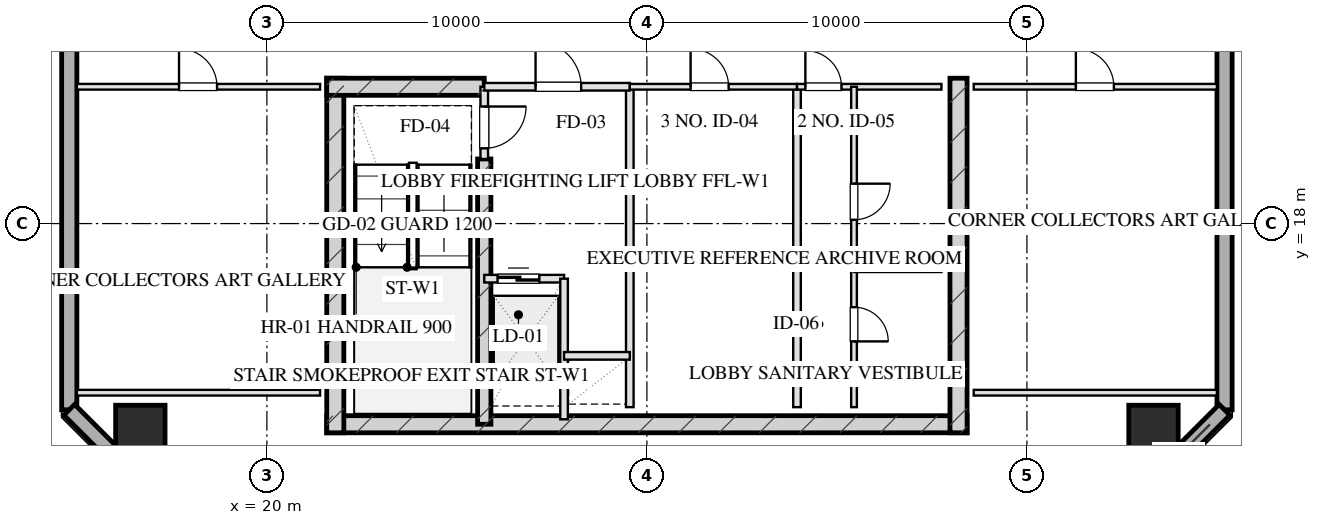
"""IFC4 building model, lengths in metres.
Left out: names, types, materials, properties, quantities, classifications, styles, units other than length and angle.
Written with IfcOpenShell. Run it as: python <this file> out.ifc"""

import sys

from ifc_helpers import new_model, si_unit, direction, frame, frame_2d, origin, origin_2d, place, context, subcontext, project, spatial, rectangle, hollow_rectangle, extrude, element, fill, save


model = new_model("IFC4")
c1 = context("Model", 3, precision=1e-05, world=origin(), true_north=direction((0.0, 1.0)))
c2 = subcontext(c1, "Body", "Model", "MODEL_VIEW")
j1 = project(units=[si_unit("LENGTHUNIT", "METRE"), si_unit("PLANEANGLEUNIT", "RADIAN")], contexts=[c1])
p1 = place(None, origin())
s1 = spatial("IfcSite", under=j1, at=p1, CompositionType="ELEMENT")
p2 = place(p1, origin())
s2 = spatial("IfcBuilding", under=s1, at=p2, CompositionType="ELEMENT")
p3 = place(p2, frame((0.0, 0.0, 244.0)))
s3 = spatial("IfcBuildingStorey", under=s2, at=p3, CompositionType="ELEMENT", Elevation=244.0)
p4 = place(p3, frame((21.575, 12.72, 0.0), z_axis=(0.0, 0.0, 1.0), x_axis=(1.0, 0.0, 0.0)))
e1 = element("IfcWall", 1, at=p4, inside=s3, PredefinedType="SHEAR", context=c2, shape_type="SweptSolid", body=[
    extrude(rectangle(XDim=16.85, YDim=0.45, at=frame_2d((8.425, 0.0))), origin(), (0.0, 0.0, 1.0), 3.2),
])
for number, where, z_axis, x_axis in (
    (2, (21.8, 21.825, 0.0), (0.0, 0.0, 1.0), (0.0, -1.0, 0.0)),
    (3, (38.2, 21.825, 0.0), (0.0, 0.0, 1.0), (0.0, -1.0, 0.0)),
):
    element("IfcWall", number, at=place(p3, frame(where, z_axis=z_axis, x_axis=x_axis)), inside=s3, PredefinedType="SHEAR", context=c2, shape_type="SweptSolid", body=[
        extrude(rectangle(XDim=9.33, YDim=0.45, at=frame_2d((4.665, 0.0))), origin(), (0.0, 0.0, 1.0), 3.2),
    ])
p5 = place(p3, frame((25.72, 19.7, 0.0), z_axis=(0.0, 0.0, 1.0), x_axis=(0.0, -1.0, 0.0)))
e4 = element("IfcWall", 4, at=p5, inside=s3, PredefinedType="SHEAR", context=c2, shape_type="SweptSolid", body=[
    extrude(rectangle(XDim=6.98, YDim=0.35, at=frame_2d((3.49, 0.0))), origin(), (0.0, 0.0, 1.0), 3.2),
])
p6 = place(p3, frame((21.575, 21.6, 0.0), z_axis=(0.0, 0.0, 1.0), x_axis=(1.0, 0.0, 0.0)))
e5 = element("IfcWall", 5, at=p6, inside=s3, PredefinedType="SHEAR", context=c2, shape_type="SweptSolid", body=[
    extrude(rectangle(XDim=4.145, YDim=0.45, at=frame_2d((2.073, 0.0))), origin(), (0.0, 0.0, 1.0), 3.2),
])
for number, where, z_axis, x_axis in (
    (6, (16.67, 12.57, 0.0), (0.0, 0.0, 1.0), (1.0, 0.0, 0.0)),
    (7, (43.33, 12.57, 0.0), (0.0, 0.0, 1.0), (1.0, 0.0, 0.0)),
):
    element("IfcColumn", number, at=place(p3, frame(where, z_axis=z_axis, x_axis=x_axis)), inside=s3, PredefinedType="COLUMN", context=c2, shape_type="SweptSolid", body=[
        extrude(hollow_rectangle(XDim=1.3, YDim=1.3, WallThickness=0.045, at=origin_2d()), origin(), (0.0, 0.0, 1.0), 3.201),
    ])
p7 = place(p3, frame((14.8, 13.1, 0.0), z_axis=(0.0, 0.0, 1.0), x_axis=(0.0, 1.0, 0.0)))
e8 = element("IfcWall", 8, at=p7, inside=s3, PredefinedType="SOLIDWALL", context=c2, shape_type="SweptSolid", body=[
    extrude(rectangle(XDim=41.8, YDim=0.4, at=frame_2d((20.9, 0.0))), origin(), (0.0, 0.0, 1.0), 2.36),
])
p8 = place(p7, frame((13.525, 0.0, 0.75)))
e9 = element("IfcOpeningElement", 9, at=p8, cuts=e8, PredefinedType="OPENING", context=c2, shape_type="SweptSolid", body=[
    extrude(rectangle(XDim=1.95, YDim=1.21, at=frame_2d((0.975, 0.605))), frame((0.0, 0.21, 0.0), z_axis=(0.0, -1.0, 0.0), x_axis=(1.0, 0.0, 0.0)), (0.0, 0.0, 1.0), 0.42),
])
p9 = place(p7, frame((17.325, 0.0, 0.75)))
e10 = element("IfcOpeningElement", 10, at=p9, cuts=e8, PredefinedType="OPENING", context=c2, shape_type="SweptSolid", body=[
    extrude(rectangle(XDim=1.95, YDim=1.21, at=frame_2d((0.975, 0.605))), frame((0.0, 0.21, 0.0), z_axis=(0.0, -1.0, 0.0), x_axis=(1.0, 0.0, 0.0)), (0.0, 0.0, 1.0), 0.42),
])
p10 = place(p7, frame((22.525, 0.0, 0.75)))
e11 = element("IfcOpeningElement", 11, at=p10, cuts=e8, PredefinedType="OPENING", context=c2, shape_type="SweptSolid", body=[
    extrude(rectangle(XDim=1.95, YDim=1.21, at=frame_2d((0.975, 0.605))), frame((0.0, 0.21, 0.0), z_axis=(0.0, -1.0, 0.0), x_axis=(1.0, 0.0, 0.0)), (0.0, 0.0, 1.0), 0.42),
])
p11 = place(p7, frame((26.325, 0.0, 0.75)))
e12 = element("IfcOpeningElement", 12, at=p11, cuts=e8, PredefinedType="OPENING", context=c2, shape_type="SweptSolid", body=[
    extrude(rectangle(XDim=1.95, YDim=1.21, at=frame_2d((0.975, 0.605))), frame((0.0, 0.21, 0.0), z_axis=(0.0, -1.0, 0.0), x_axis=(1.0, 0.0, 0.0)), (0.0, 0.0, 1.0), 0.42),
])
p12 = place(p3, frame((45.2, 54.9, 0.0), z_axis=(0.0, 0.0, 1.0), x_axis=(0.0, -1.0, 0.0)))
e13 = element("IfcWall", 13, at=p12, inside=s3, PredefinedType="SOLIDWALL", context=c2, shape_type="SweptSolid", body=[
    extrude(rectangle(XDim=41.8, YDim=0.4, at=frame_2d((20.9, 0.0))), origin(), (0.0, 0.0, 1.0), 2.36),
])
p13 = place(p12, frame((26.325, 0.0, 0.75)))
e14 = element("IfcOpeningElement", 14, at=p13, cuts=e13, PredefinedType="OPENING", context=c2, shape_type="SweptSolid", body=[
    extrude(rectangle(XDim=1.95, YDim=1.21, at=frame_2d((0.975, 0.605))), frame((0.0, 0.21, 0.0), z_axis=(0.0, -1.0, 0.0), x_axis=(1.0, 0.0, 0.0)), (0.0, 0.0, 1.0), 0.42),
])
p14 = place(p12, frame((22.525, 0.0, 0.75)))
e15 = element("IfcOpeningElement", 15, at=p14, cuts=e13, PredefinedType="OPENING", context=c2, shape_type="SweptSolid", body=[
    extrude(rectangle(XDim=1.95, YDim=1.21, at=frame_2d((0.975, 0.605))), frame((0.0, 0.21, 0.0), z_axis=(0.0, -1.0, 0.0), x_axis=(1.0, 0.0, 0.0)), (0.0, 0.0, 1.0), 0.42),
])
p15 = place(p12, frame((17.325, 0.0, 0.75)))
e16 = element("IfcOpeningElement", 16, at=p15, cuts=e13, PredefinedType="OPENING", context=c2, shape_type="SweptSolid", body=[
    extrude(rectangle(XDim=1.95, YDim=1.21, at=frame_2d((0.975, 0.605))), frame((0.0, 0.21, 0.0), z_axis=(0.0, -1.0, 0.0), x_axis=(1.0, 0.0, 0.0)), (0.0, 0.0, 1.0), 0.42),
])
p16 = place(p12, frame((13.525, 0.0, 0.75)))
e17 = element("IfcOpeningElement", 17, at=p16, cuts=e13, PredefinedType="OPENING", context=c2, shape_type="SweptSolid", body=[
    extrude(rectangle(XDim=1.95, YDim=1.21, at=frame_2d((0.975, 0.605))), frame((0.0, 0.21, 0.0), z_axis=(0.0, -1.0, 0.0), x_axis=(1.0, 0.0, 0.0)), (0.0, 0.0, 1.0), 0.42),
])
for number, where, z_axis, x_axis in (
    (18, (45.2, 13.1, 0.0), (0.0, 0.0, 1.0), (-0.707, -0.707, 0.0)),
    (19, (17.2, 10.7, 0.0), (0.0, 0.0, 1.0), (-0.707, 0.707, 0.0)),
):
    element("IfcWall", number, at=place(p3, frame(where, z_axis=z_axis, x_axis=x_axis)), inside=s3, PredefinedType="SOLIDWALL", context=c2, shape_type="SweptSolid", body=[
        extrude(rectangle(XDim=3.394, YDim=0.4, at=frame_2d((1.697, 0.0))), origin(), (0.0, 0.0, 1.0), 2.36),
    ])
p17 = place(p3, frame((25.72, 21.6, 0.0), z_axis=(0.0, 0.0, 1.0), x_axis=(0.0, -1.0, 0.0)))
e20 = element("IfcWall", 20, at=p17, inside=s3, PredefinedType="PARTITIONING", context=c2, shape_type="SweptSolid", body=[
    extrude(rectangle(XDim=1.9, YDim=0.2, at=frame_2d((0.95, 0.0))), origin(), (0.0, 0.0, 1.0), 2.925),
])
p18 = place(p17, frame((0.52, 0.0, 0.0)))
e21 = element("IfcOpeningElement", 21, at=p18, cuts=e20, PredefinedType="OPENING", context=c2, shape_type="SweptSolid", body=[
    extrude(rectangle(XDim=1.1, YDim=2.05, at=frame_2d((0.55, 1.025))), frame((0.0, 0.11, 0.0), z_axis=(0.0, -1.0, 0.0), x_axis=(1.0, 0.0, 0.0)), (0.0, 0.0, 1.0), 0.22),
])
p19 = place(p3, frame((29.55, 21.6, 0.0), z_axis=(0.0, 0.0, 1.0), x_axis=(0.0, -1.0, 0.0)))
e22 = element("IfcWall", 22, at=p19, inside=s3, PredefinedType="PARTITIONING", context=c2, shape_type="SweptSolid", body=[
    extrude(rectangle(XDim=8.43, YDim=0.2, at=frame_2d((4.215, 0.0))), origin(), (0.0, 0.0, 1.0), 2.925),
])
p20 = place(p3, frame((25.72, 21.6, 0.0), z_axis=(0.0, 0.0, 1.0), x_axis=(1.0, 0.0, 0.0)))
e23 = element("IfcWall", 23, at=p20, inside=s3, PredefinedType="PARTITIONING", context=c2, shape_type="SweptSolid", body=[
    extrude(rectangle(XDim=3.83, YDim=0.2, at=frame_2d((1.915, 0.0))), origin(), (0.0, 0.0, 1.0), 2.925),
])
p21 = place(p20, frame((1.35, 0.0, 0.0)))
e24 = element("IfcOpeningElement", 24, at=p21, cuts=e23, PredefinedType="OPENING", context=c2, shape_type="SweptSolid", body=[
    extrude(rectangle(XDim=1.2, YDim=2.05, at=frame_2d((0.6, 1.025))), frame((0.0, 0.11, 0.0), z_axis=(0.0, -1.0, 0.0), x_axis=(1.0, 0.0, 0.0)), (0.0, 0.0, 1.0), 0.22),
])
p22 = place(p3, frame((25.72, 16.55, 0.0), z_axis=(0.0, 0.0, 1.0), x_axis=(1.0, 0.0, 0.0)))
e25 = element("IfcWall", 25, at=p22, inside=s3, PredefinedType="PARTITIONING", context=c2, shape_type="SweptSolid", body=[
    extrude(rectangle(XDim=2.1, YDim=0.2, at=frame_2d((1.05, 0.0))), origin(), (0.0, 0.0, 1.0), 2.925),
])
p23 = place(p22, frame((0.35, 0.0, 0.0)))
e26 = element("IfcOpeningElement", 26, at=p23, cuts=e25, PredefinedType="OPENING", context=c2, shape_type="SweptSolid", body=[
    extrude(rectangle(XDim=1.1, YDim=2.05, at=frame_2d((0.55, 1.025))), frame((0.0, 0.11, 0.0), z_axis=(0.0, -1.0, 0.0), x_axis=(1.0, 0.0, 0.0)), (0.0, 0.0, 1.0), 0.22),
])
p24 = place(p3, frame((27.82, 16.55, 0.0), z_axis=(0.0, 0.0, 1.0), x_axis=(0.0, -1.0, 0.0)))
e27 = element("IfcWall", 27, at=p24, inside=s3, PredefinedType="PARTITIONING", context=c2, shape_type="SweptSolid", body=[
    extrude(rectangle(XDim=3.7, YDim=0.2, at=frame_2d((1.85, 0.0))), origin(), (0.0, 0.0, 1.0), 2.925),
])
p25 = place(p3, frame((27.82, 14.52, 0.0), z_axis=(0.0, 0.0, 1.0), x_axis=(1.0, 0.0, 0.0)))
e28 = element("IfcWall", 28, at=p25, inside=s3, PredefinedType="PARTITIONING", context=c2, shape_type="SweptSolid", body=[
    extrude(rectangle(XDim=1.73, YDim=0.2, at=frame_2d((0.865, 0.0))), origin(), (0.0, 0.0, 1.0), 2.925),
])
p26 = place(p3, frame((33.95, 21.6, 0.0), z_axis=(0.0, 0.0, 1.0), x_axis=(0.0, -1.0, 0.0)))
e29 = element("IfcWall", 29, at=p26, inside=s3, PredefinedType="PARTITIONING", context=c2, shape_type="SweptSolid", body=[
    extrude(rectangle(XDim=8.43, YDim=0.2, at=frame_2d((4.215, 0.0))), origin(), (0.0, 0.0, 1.0), 2.925),
])
p27 = place(p3, frame((29.55, 21.6, 0.0), z_axis=(0.0, 0.0, 1.0), x_axis=(1.0, 0.0, 0.0)))
e30 = element("IfcWall", 30, at=p27, inside=s3, PredefinedType="PARTITIONING", context=c2, shape_type="SweptSolid", body=[
    extrude(rectangle(XDim=4.4, YDim=0.15, at=frame_2d((2.2, 0.0))), origin(), (0.0, 0.0, 1.0), 2.925),
])
p28 = place(p27, frame((1.6, 0.0, 0.0)))
e31 = element("IfcOpeningElement", 31, at=p28, cuts=e30, PredefinedType="OPENING", context=c2, shape_type="SweptSolid", body=[
    extrude(rectangle(XDim=1.0, YDim=2.05, at=frame_2d((0.5, 1.025))), frame((0.0, 0.085, 0.0), z_axis=(0.0, -1.0, 0.0), x_axis=(1.0, 0.0, 0.0)), (0.0, 0.0, 1.0), 0.17),
])
p29 = place(p3, frame((33.95, 21.6, 0.0), z_axis=(0.0, 0.0, 1.0), x_axis=(1.0, 0.0, 0.0)))
e32 = element("IfcWall", 32, at=p29, inside=s3, PredefinedType="PARTITIONING", context=c2, shape_type="SweptSolid", body=[
    extrude(rectangle(XDim=3.8, YDim=0.15, at=frame_2d((1.9, 0.0))), origin(), (0.0, 0.0, 1.0), 2.925),
])
p30 = place(p29, frame((0.22, 0.0, 0.0)))
e33 = element("IfcOpeningElement", 33, at=p30, cuts=e32, PredefinedType="OPENING", context=c2, shape_type="SweptSolid", body=[
    extrude(rectangle(XDim=0.95, YDim=2.05, at=frame_2d((0.475, 1.025))), frame((0.0, 0.085, 0.0), z_axis=(0.0, -1.0, 0.0), x_axis=(1.0, 0.0, 0.0)), (0.0, 0.0, 1.0), 0.17),
])
p31 = place(p3, frame((35.45, 21.6, 0.0), z_axis=(0.0, 0.0, 1.0), x_axis=(0.0, -1.0, 0.0)))
e34 = element("IfcWall", 34, at=p31, inside=s3, PredefinedType="PARTITIONING", context=c2, shape_type="SweptSolid", body=[
    extrude(rectangle(XDim=8.43, YDim=0.15, at=frame_2d((4.215, 0.0))), origin(), (0.0, 0.0, 1.0), 2.515),
])
p32 = place(p31, frame((2.55, 0.0, 0.0)))
e35 = element("IfcOpeningElement", 35, at=p32, cuts=e34, PredefinedType="OPENING", context=c2, shape_type="SweptSolid", body=[
    extrude(rectangle(XDim=0.95, YDim=2.05, at=frame_2d((0.475, 1.025))), frame((0.0, 0.085, 0.0), z_axis=(0.0, -1.0, 0.0), x_axis=(1.0, 0.0, 0.0)), (0.0, 0.0, 1.0), 0.17),
])
p33 = place(p31, frame((5.8, 0.0, 0.0)))
e36 = element("IfcOpeningElement", 36, at=p33, cuts=e34, PredefinedType="OPENING", context=c2, shape_type="SweptSolid", body=[
    extrude(rectangle(XDim=0.9, YDim=2.05, at=frame_2d((0.45, 1.025))), frame((0.0, 0.085, 0.0), z_axis=(0.0, -1.0, 0.0), x_axis=(1.0, 0.0, 0.0)), (0.0, 0.0, 1.0), 0.17),
])
p34 = place(p3, frame((35.45, 16.8, 0.0), z_axis=(0.0, 0.0, 1.0), x_axis=(1.0, 0.0, 0.0)))
e37 = element("IfcWall", 37, at=p34, inside=s3, PredefinedType="PARTITIONING", context=c2, shape_type="SweptSolid", body=[
    extrude(rectangle(XDim=2.3, YDim=0.15, at=frame_2d((1.15, 0.0))), origin(), (0.0, 0.0, 1.0), 2.925),
])
p35 = place(p3, frame((15.0, 13.55, 0.0), z_axis=(0.0, 0.0, 1.0), x_axis=(1.0, 0.0, 0.0)))
e38 = element("IfcWall", 38, at=p35, inside=s3, PredefinedType="PARTITIONING", context=c2, shape_type="SweptSolid", body=[
    extrude(rectangle(XDim=6.4, YDim=0.15, at=frame_2d((3.2, 0.0))), origin(), (0.0, 0.0, 1.0), 2.925),
])
p36 = place(p3, frame((15.0, 21.6, 0.0), z_axis=(0.0, 0.0, 1.0), x_axis=(1.0, 0.0, 0.0)))
e39 = element("IfcWall", 39, at=p36, inside=s3, PredefinedType="PARTITIONING", context=c2, shape_type="SweptSolid", body=[
    extrude(rectangle(XDim=6.4, YDim=0.15, at=frame_2d((3.2, 0.0))), origin(), (0.0, 0.0, 1.0), 2.925),
])
p37 = place(p36, frame((2.688, 0.0, 0.0)))
e40 = element("IfcOpeningElement", 40, at=p37, cuts=e39, PredefinedType="OPENING", context=c2, shape_type="SweptSolid", body=[
    extrude(rectangle(XDim=1.0, YDim=2.05, at=frame_2d((0.5, 1.025))), frame((0.0, 0.085, 0.0), z_axis=(0.0, -1.0, 0.0), x_axis=(1.0, 0.0, 0.0)), (0.0, 0.0, 1.0), 0.17),
])
p38 = place(p3, frame((38.6, 13.55, 0.0), z_axis=(0.0, 0.0, 1.0), x_axis=(1.0, 0.0, 0.0)))
e41 = element("IfcWall", 41, at=p38, inside=s3, PredefinedType="PARTITIONING", context=c2, shape_type="SweptSolid", body=[
    extrude(rectangle(XDim=6.4, YDim=0.15, at=frame_2d((3.2, 0.0))), origin(), (0.0, 0.0, 1.0), 2.925),
])
p39 = place(p3, frame((38.6, 21.6, 0.0), z_axis=(0.0, 0.0, 1.0), x_axis=(1.0, 0.0, 0.0)))
e42 = element("IfcWall", 42, at=p39, inside=s3, PredefinedType="PARTITIONING", context=c2, shape_type="SweptSolid", body=[
    extrude(rectangle(XDim=6.4, YDim=0.15, at=frame_2d((3.2, 0.0))), origin(), (0.0, 0.0, 1.0), 2.925),
])
p40 = place(p39, frame((2.688, 0.0, 0.0)))
e43 = element("IfcOpeningElement", 43, at=p40, cuts=e42, PredefinedType="OPENING", context=c2, shape_type="SweptSolid", body=[
    extrude(rectangle(XDim=1.0, YDim=2.05, at=frame_2d((0.5, 1.025))), frame((0.0, 0.085, 0.0), z_axis=(0.0, -1.0, 0.0), x_axis=(1.0, 0.0, 0.0)), (0.0, 0.0, 1.0), 0.17),
])
p41 = place(p18, origin())
e44 = element("IfcDoor", 44, at=p41, inside=s3, OperationType="SINGLE_SWING_LEFT", PredefinedType="DOOR", context=c2, shape_type="SweptSolid", body=[
    extrude(rectangle(XDim=1.1, YDim=2.05, at=frame_2d((0.55, 1.025))), frame((0.0, 0.025, 0.0), z_axis=(0.0, -1.0, 0.0), x_axis=(1.0, 0.0, 0.0)), (0.0, 0.0, 1.0), 0.05),
])
fill(e21, e44)
p42 = place(p21, origin())
e45 = element("IfcDoor", 45, at=p42, inside=s3, OperationType="SINGLE_SWING_LEFT", PredefinedType="DOOR", context=c2, shape_type="SweptSolid", body=[
    extrude(rectangle(XDim=1.2, YDim=2.05, at=frame_2d((0.6, 1.025))), frame((0.0, 0.025, 0.0), z_axis=(0.0, -1.0, 0.0), x_axis=(1.0, 0.0, 0.0)), (0.0, 0.0, 1.0), 0.05),
])
fill(e24, e45)
p43 = place(p23, origin())
e46 = element("IfcDoor", 46, at=p43, inside=s3, OperationType="DOUBLE_DOOR_SLIDING", PredefinedType="DOOR", context=c2, shape_type="SweptSolid", body=[
    extrude(rectangle(XDim=1.1, YDim=2.05, at=frame_2d((0.55, 1.025))), frame((0.0, 0.025, 0.0), z_axis=(0.0, -1.0, 0.0), x_axis=(1.0, 0.0, 0.0)), (0.0, 0.0, 1.0), 0.05),
])
fill(e26, e46)
p44 = place(p28, origin())
e47 = element("IfcDoor", 47, at=p44, inside=s3, OperationType="SINGLE_SWING_LEFT", PredefinedType="DOOR", context=c2, shape_type="SweptSolid", body=[
    extrude(rectangle(XDim=1.0, YDim=2.05, at=frame_2d((0.5, 1.025))), frame((0.0, 0.025, 0.0), z_axis=(0.0, -1.0, 0.0), x_axis=(1.0, 0.0, 0.0)), (0.0, 0.0, 1.0), 0.05),
])
fill(e31, e47)
p45 = place(p30, origin())
e48 = element("IfcDoor", 48, at=p45, inside=s3, OperationType="SINGLE_SWING_LEFT", PredefinedType="DOOR", context=c2, shape_type="SweptSolid", body=[
    extrude(rectangle(XDim=0.95, YDim=2.05, at=frame_2d((0.475, 1.025))), frame((0.0, 0.025, 0.0), z_axis=(0.0, -1.0, 0.0), x_axis=(1.0, 0.0, 0.0)), (0.0, 0.0, 1.0), 0.05),
])
fill(e33, e48)
p46 = place(p32, origin())
e49 = element("IfcDoor", 49, at=p46, inside=s3, OperationType="SINGLE_SWING_LEFT", PredefinedType="DOOR", context=c2, shape_type="SweptSolid", body=[
    extrude(rectangle(XDim=0.95, YDim=2.05, at=frame_2d((0.475, 1.025))), frame((0.0, 0.025, 0.0), z_axis=(0.0, -1.0, 0.0), x_axis=(1.0, 0.0, 0.0)), (0.0, 0.0, 1.0), 0.05),
])
fill(e35, e49)
p47 = place(p33, origin())
e50 = element("IfcDoor", 50, at=p47, inside=s3, OperationType="SINGLE_SWING_RIGHT", PredefinedType="DOOR", context=c2, shape_type="SweptSolid", body=[
    extrude(rectangle(XDim=0.9, YDim=2.05, at=frame_2d((0.45, 1.025))), frame((0.0, 0.025, 0.0), z_axis=(0.0, -1.0, 0.0), x_axis=(1.0, 0.0, 0.0)), (0.0, 0.0, 1.0), 0.05),
])
fill(e36, e50)
p48 = place(p37, origin())
e51 = element("IfcDoor", 51, at=p48, inside=s3, OperationType="SINGLE_SWING_LEFT", PredefinedType="DOOR", context=c2, shape_type="SweptSolid", body=[
    extrude(rectangle(XDim=1.0, YDim=2.05, at=frame_2d((0.5, 1.025))), frame((0.0, 0.025, 0.0), z_axis=(0.0, -1.0, 0.0), x_axis=(1.0, 0.0, 0.0)), (0.0, 0.0, 1.0), 0.05),
])
fill(e40, e51)
p49 = place(p40, origin())
e52 = element("IfcDoor", 52, at=p49, inside=s3, OperationType="SINGLE_SWING_LEFT", PredefinedType="DOOR", context=c2, shape_type="SweptSolid", body=[
    extrude(rectangle(XDim=1.0, YDim=2.05, at=frame_2d((0.5, 1.025))), frame((0.0, 0.025, 0.0), z_axis=(0.0, -1.0, 0.0), x_axis=(1.0, 0.0, 0.0)), (0.0, 0.0, 1.0), 0.05),
])
fill(e43, e52)
save(model, sys.argv[1])
